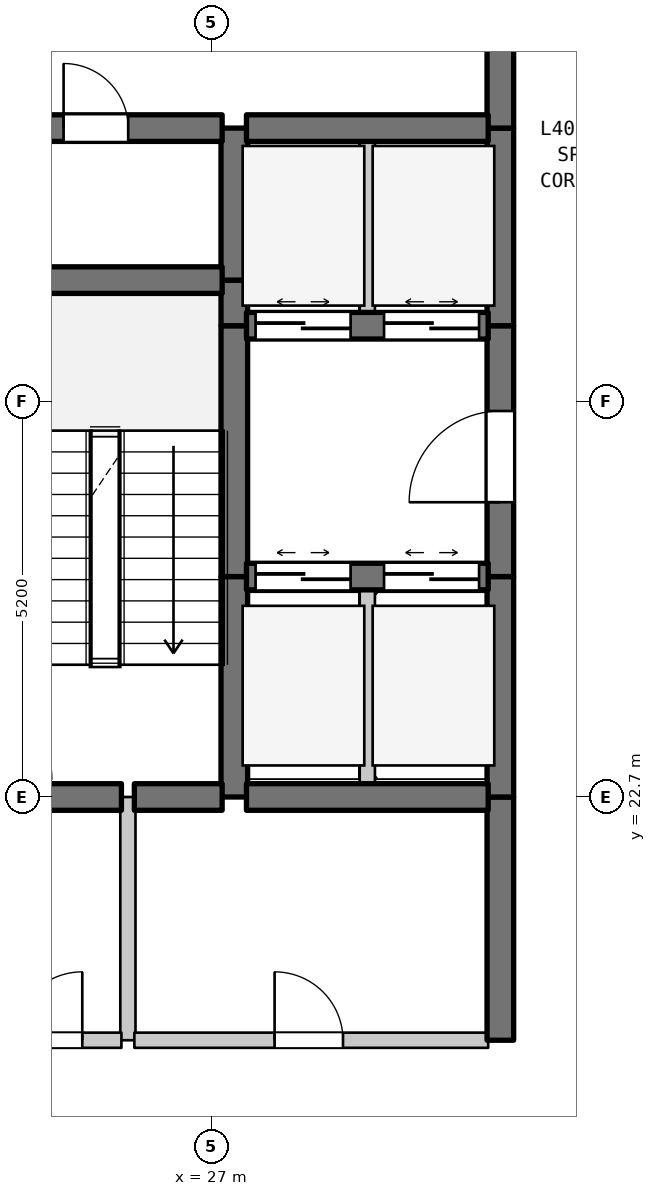
"""IFC4 building model, lengths in metres.
Left out: names, types, materials, properties, quantities, classifications, styles, units other than length and angle.
Written with IfcOpenShell. Run it as: python <this file> out.ifc"""

import sys

from ifc_helpers import new_model, si_unit, direction, frame, frame_2d, origin, place, context, subcontext, project, spatial, rectangle, extrude, element, fill, save


model = new_model("IFC4")
c1 = context("Model", 3, precision=1e-05, world=origin(), true_north=direction((0.0, 1.0)))
c2 = subcontext(c1, "Body", "Model", "MODEL_VIEW")
j1 = project(units=[si_unit("LENGTHUNIT", "METRE"), si_unit("PLANEANGLEUNIT", "RADIAN")], contexts=[c1])
p1 = place(None, origin())
s1 = spatial("IfcSite", under=j1, at=p1, CompositionType="ELEMENT")
p2 = place(p1, origin())
s2 = spatial("IfcBuilding", under=s1, at=p2, CompositionType="ELEMENT")
p3 = place(p2, frame((0.0, 0.0, 164.6)))
s3 = spatial("IfcBuildingStorey", under=s2, at=p3, CompositionType="ELEMENT", Elevation=164.6)
p4 = place(p3, frame((25.9, 19.5, 0.0), z_axis=(0.0, 0.0, 1.0), x_axis=(0.0, 1.0, 0.0)))
e1 = element("IfcWall", 1, at=p4, inside=s3, PredefinedType="STANDARD", context=c2, shape_type="SweptSolid", body=[
    extrude(rectangle(XDim=3.2, YDim=0.2, at=frame_2d((1.6, 0.0))), origin(), (0.0, 0.0, 1.0), 4.19),
])
p5 = place(p3, frame((27.3, 22.7, 0.0), z_axis=(0.0, 0.0, 1.0), x_axis=(0.0, 1.0, 0.0)))
e2 = element("IfcWall", 2, at=p5, inside=s3, PredefinedType="SHEAR", context=c2, shape_type="SweptSolid", body=[
    extrude(rectangle(XDim=2.9, YDim=0.35, at=frame_2d((1.45, 0.0))), origin(), (0.0, 0.0, 1.0), 4.19),
])
p6 = place(p3, frame((27.3, 25.6, 0.0), z_axis=(0.0, 0.0, 1.0), x_axis=(0.0, 1.0, 0.0)))
e3 = element("IfcWall", 3, at=p6, inside=s3, PredefinedType="SHEAR", context=c2, shape_type="SweptSolid", body=[
    extrude(rectangle(XDim=3.3, YDim=0.35, at=frame_2d((1.65, 0.0))), origin(), (0.0, 0.0, 1.0), 4.19),
])
p7 = place(p3, frame((27.3, 28.9, 0.0), z_axis=(0.0, 0.0, 1.0), x_axis=(0.0, 1.0, 0.0)))
e4 = element("IfcWall", 4, at=p7, inside=s3, PredefinedType="SHEAR", context=c2, shape_type="SweptSolid", body=[
    extrude(rectangle(XDim=0.6, YDim=0.35, at=frame_2d((0.3, 0.0))), origin(), (0.0, 0.0, 1.0), 4.19),
])
p8 = place(p3, frame((27.3, 29.5, 0.0), z_axis=(0.0, 0.0, 1.0), x_axis=(0.0, 1.0, 0.0)))
e5 = element("IfcWall", 5, at=p8, inside=s3, PredefinedType="SHEAR", context=c2, shape_type="SweptSolid", body=[
    extrude(rectangle(XDim=2.0, YDim=0.35, at=frame_2d((1.0, 0.0))), origin(), (0.0, 0.0, 1.0), 4.19),
])
p9 = place(p3, frame((29.05, 22.7, 0.0), z_axis=(0.0, 0.0, 1.0), x_axis=(0.0, 1.0, 0.0)))
e6 = element("IfcWall", 6, at=p9, inside=s3, PredefinedType="STANDARD", context=c2, shape_type="SweptSolid", body=[
    extrude(rectangle(XDim=2.9, YDim=0.2, at=frame_2d((1.45, 0.0))), origin(), (0.0, 0.0, 1.0), 4.19),
])
p10 = place(p3, frame((29.05, 28.9, 0.0), z_axis=(0.0, 0.0, 1.0), x_axis=(0.0, 1.0, 0.0)))
e7 = element("IfcWall", 7, at=p10, inside=s3, PredefinedType="STANDARD", context=c2, shape_type="SweptSolid", body=[
    extrude(rectangle(XDim=2.6, YDim=0.2, at=frame_2d((1.3, 0.0))), origin(), (0.0, 0.0, 1.0), 4.19),
])
p11 = place(p3, frame((30.8, 19.5, 0.0), z_axis=(0.0, 0.0, 1.0), x_axis=(0.0, 1.0, 0.0)))
e8 = element("IfcWall", 8, at=p11, inside=s3, PredefinedType="SHEAR", context=c2, shape_type="SweptSolid", body=[
    extrude(rectangle(XDim=3.2, YDim=0.35, at=frame_2d((1.6, 0.0))), origin(), (0.0, 0.0, 1.0), 4.19),
])
p12 = place(p3, frame((30.8, 22.7, 0.0), z_axis=(0.0, 0.0, 1.0), x_axis=(0.0, 1.0, 0.0)))
e9 = element("IfcWall", 9, at=p12, inside=s3, PredefinedType="SHEAR", context=c2, shape_type="SweptSolid", body=[
    extrude(rectangle(XDim=2.9, YDim=0.35, at=frame_2d((1.45, 0.0))), origin(), (0.0, 0.0, 1.0), 4.19),
])
p13 = place(p3, frame((30.8, 25.6, 0.0), z_axis=(0.0, 0.0, 1.0), x_axis=(0.0, 1.0, 0.0)))
e10 = element("IfcWall", 10, at=p13, inside=s3, PredefinedType="SHEAR", context=c2, shape_type="SweptSolid", body=[
    extrude(rectangle(XDim=3.3, YDim=0.35, at=frame_2d((1.65, 0.0))), origin(), (0.0, 0.0, 1.0), 4.19),
])
p14 = place(p13, frame((0.978, 0.0, 0.0)))
e11 = element("IfcOpeningElement", 11, at=p14, cuts=e10, PredefinedType="OPENING", context=c2, shape_type="SweptSolid", body=[
    extrude(rectangle(XDim=1.2, YDim=2.2, at=frame_2d((0.6, 1.1))), frame((0.0, 0.185, 0.0), z_axis=(0.0, -1.0, 0.0), x_axis=(1.0, 0.0, 0.0)), (0.0, 0.0, 1.0), 0.37),
])
p15 = place(p3, frame((30.8, 28.9, 0.0), z_axis=(0.0, 0.0, 1.0), x_axis=(0.0, 1.0, 0.0)))
e12 = element("IfcWall", 12, at=p15, inside=s3, PredefinedType="SHEAR", context=c2, shape_type="SweptSolid", body=[
    extrude(rectangle(XDim=2.6, YDim=0.35, at=frame_2d((1.3, 0.0))), origin(), (0.0, 0.0, 1.0), 4.19),
])
p16 = place(p3, frame((30.8, 31.5, 0.0), z_axis=(0.0, 0.0, 1.0), x_axis=(0.0, 1.0, 0.0)))
e13 = element("IfcWall", 13, at=p16, inside=s3, PredefinedType="SHEAR", context=c2, shape_type="SweptSolid", body=[
    extrude(rectangle(XDim=3.5, YDim=0.35, at=frame_2d((1.75, 0.0))), origin(), (0.0, 0.0, 1.0), 4.19),
])
p17 = place(p16, frame((1.15, 0.0, 0.0)))
e14 = element("IfcOpeningElement", 14, at=p17, cuts=e13, PredefinedType="OPENING", context=c2, shape_type="SweptSolid", body=[
    extrude(rectangle(XDim=1.2, YDim=2.2, at=frame_2d((0.6, 1.1))), frame((0.0, 0.185, 0.0), z_axis=(0.0, -1.0, 0.0), x_axis=(1.0, 0.0, 0.0)), (0.0, 0.0, 1.0), 0.37),
])
p18 = place(p3, frame((23.96, 19.5, 0.0), z_axis=(0.0, 0.0, 1.0), x_axis=(1.0, 0.0, 0.0)))
e15 = element("IfcWall", 15, at=p18, inside=s3, PredefinedType="STANDARD", context=c2, shape_type="SweptSolid", body=[
    extrude(rectangle(XDim=1.855, YDim=0.2, at=frame_2d((0.927, 0.0))), origin(), (0.0, 0.0, 1.0), 4.19),
])
p19 = place(p18, frame((0.44, 0.0, 0.0)))
e16 = element("IfcOpeningElement", 16, at=p19, cuts=e15, PredefinedType="OPENING", context=c2, shape_type="SweptSolid", body=[
    extrude(rectangle(XDim=0.9, YDim=2.15, at=frame_2d((0.45, 1.075))), frame((0.0, 0.11, 0.0), z_axis=(0.0, -1.0, 0.0), x_axis=(1.0, 0.0, 0.0)), (0.0, 0.0, 1.0), 0.22),
])
p20 = place(p3, frame((25.985, 19.5, 0.0), z_axis=(0.0, 0.0, 1.0), x_axis=(1.0, 0.0, 0.0)))
e17 = element("IfcWall", 17, at=p20, inside=s3, PredefinedType="STANDARD", context=c2, shape_type="SweptSolid", body=[
    extrude(rectangle(XDim=4.655, YDim=0.2, at=frame_2d((2.327, 0.0))), origin(), (0.0, 0.0, 1.0), 4.19),
])
p21 = place(p20, frame((1.845, 0.0, 0.0)))
e18 = element("IfcOpeningElement", 18, at=p21, cuts=e17, PredefinedType="OPENING", context=c2, shape_type="SweptSolid", body=[
    extrude(rectangle(XDim=0.9, YDim=2.15, at=frame_2d((0.45, 1.075))), frame((0.0, 0.11, 0.0), z_axis=(0.0, -1.0, 0.0), x_axis=(1.0, 0.0, 0.0)), (0.0, 0.0, 1.0), 0.22),
])
p22 = place(p3, frame((23.96, 22.7, 0.0), z_axis=(0.0, 0.0, 1.0), x_axis=(1.0, 0.0, 0.0)))
e19 = element("IfcWall", 19, at=p22, inside=s3, PredefinedType="SHEAR", context=c2, shape_type="SweptSolid", body=[
    extrude(rectangle(XDim=1.855, YDim=0.35, at=frame_2d((0.927, 0.0))), origin(), (0.0, 0.0, 1.0), 4.19),
])
p23 = place(p3, frame((25.985, 22.7, 0.0), z_axis=(0.0, 0.0, 1.0), x_axis=(1.0, 0.0, 0.0)))
e20 = element("IfcWall", 20, at=p23, inside=s3, PredefinedType="SHEAR", context=c2, shape_type="SweptSolid", body=[
    extrude(rectangle(XDim=1.155, YDim=0.35, at=frame_2d((0.577, 0.0))), origin(), (0.0, 0.0, 1.0), 4.19),
])
p24 = place(p3, frame((27.46, 22.7, 0.0), z_axis=(0.0, 0.0, 1.0), x_axis=(1.0, 0.0, 0.0)))
e21 = element("IfcWall", 21, at=p24, inside=s3, PredefinedType="SHEAR", context=c2, shape_type="SweptSolid", body=[
    extrude(rectangle(XDim=3.18, YDim=0.35, at=frame_2d((1.59, 0.0))), origin(), (0.0, 0.0, 1.0), 4.19),
])
p25 = place(p3, frame((27.46, 25.6, 0.0), z_axis=(0.0, 0.0, 1.0), x_axis=(1.0, 0.0, 0.0)))
e22 = element("IfcWall", 22, at=p25, inside=s3, PredefinedType="SHEAR", context=c2, shape_type="SweptSolid", body=[
    extrude(rectangle(XDim=3.18, YDim=0.35, at=frame_2d((1.59, 0.0))), origin(), (0.0, 0.0, 1.0), 4.19),
])
p26 = place(p25, frame((0.12, 0.0, 0.0)))
e23 = element("IfcOpeningElement", 23, at=p26, cuts=e22, PredefinedType="OPENING", context=c2, shape_type="SweptSolid", body=[
    extrude(rectangle(XDim=1.25, YDim=2.2, at=frame_2d((0.625, 1.1))), frame((0.0, 0.185, 0.0), z_axis=(0.0, -1.0, 0.0), x_axis=(1.0, 0.0, 0.0)), (0.0, 0.0, 1.0), 0.37),
])
p27 = place(p25, frame((1.81, 0.0, 0.0)))
e24 = element("IfcOpeningElement", 24, at=p27, cuts=e22, PredefinedType="OPENING", context=c2, shape_type="SweptSolid", body=[
    extrude(rectangle(XDim=1.25, YDim=2.2, at=frame_2d((0.625, 1.1))), frame((0.0, 0.185, 0.0), z_axis=(0.0, -1.0, 0.0), x_axis=(1.0, 0.0, 0.0)), (0.0, 0.0, 1.0), 0.37),
])
p28 = place(p3, frame((27.46, 28.9, 0.0), z_axis=(0.0, 0.0, 1.0), x_axis=(1.0, 0.0, 0.0)))
e25 = element("IfcWall", 25, at=p28, inside=s3, PredefinedType="SHEAR", context=c2, shape_type="SweptSolid", body=[
    extrude(rectangle(XDim=3.18, YDim=0.35, at=frame_2d((1.59, 0.0))), origin(), (0.0, 0.0, 1.0), 4.19),
])
p29 = place(p28, frame((0.12, 0.0, 0.0)))
e26 = element("IfcOpeningElement", 26, at=p29, cuts=e25, PredefinedType="OPENING", context=c2, shape_type="SweptSolid", body=[
    extrude(rectangle(XDim=1.25, YDim=2.2, at=frame_2d((0.625, 1.1))), frame((0.0, 0.185, 0.0), z_axis=(0.0, -1.0, 0.0), x_axis=(1.0, 0.0, 0.0)), (0.0, 0.0, 1.0), 0.37),
])
p30 = place(p28, frame((1.81, 0.0, 0.0)))
e27 = element("IfcOpeningElement", 27, at=p30, cuts=e25, PredefinedType="OPENING", context=c2, shape_type="SweptSolid", body=[
    extrude(rectangle(XDim=1.25, YDim=2.2, at=frame_2d((0.625, 1.1))), frame((0.0, 0.185, 0.0), z_axis=(0.0, -1.0, 0.0), x_axis=(1.0, 0.0, 0.0)), (0.0, 0.0, 1.0), 0.37),
])
p31 = place(p3, frame((23.96, 29.5, 0.0), z_axis=(0.0, 0.0, 1.0), x_axis=(1.0, 0.0, 0.0)))
e28 = element("IfcWall", 28, at=p31, inside=s3, PredefinedType="SHEAR", context=c2, shape_type="SweptSolid", body=[
    extrude(rectangle(XDim=3.18, YDim=0.35, at=frame_2d((1.59, 0.0))), origin(), (0.0, 0.0, 1.0), 4.19),
])
p32 = place(p3, frame((23.96, 31.5, 0.0), z_axis=(0.0, 0.0, 1.0), x_axis=(1.0, 0.0, 0.0)))
e29 = element("IfcWall", 29, at=p32, inside=s3, PredefinedType="SHEAR", context=c2, shape_type="SweptSolid", body=[
    extrude(rectangle(XDim=3.18, YDim=0.35, at=frame_2d((1.59, 0.0))), origin(), (0.0, 0.0, 1.0), 4.19),
])
p33 = place(p32, frame((1.094, 0.0, 0.0)))
e30 = element("IfcOpeningElement", 30, at=p33, cuts=e29, PredefinedType="OPENING", context=c2, shape_type="SweptSolid", body=[
    extrude(rectangle(XDim=0.85, YDim=2.1, at=frame_2d((0.425, 1.05))), frame((0.0, 0.185, 0.0), z_axis=(0.0, -1.0, 0.0), x_axis=(1.0, 0.0, 0.0)), (0.0, 0.0, 1.0), 0.37),
])
p34 = place(p3, frame((27.46, 31.5, 0.0), z_axis=(0.0, 0.0, 1.0), x_axis=(1.0, 0.0, 0.0)))
e31 = element("IfcWall", 31, at=p34, inside=s3, PredefinedType="SHEAR", context=c2, shape_type="SweptSolid", body=[
    extrude(rectangle(XDim=3.18, YDim=0.35, at=frame_2d((1.59, 0.0))), origin(), (0.0, 0.0, 1.0), 4.19),
])
p35 = place(p14, origin())
e32 = element("IfcDoor", 32, at=p35, inside=s3, OperationType="SINGLE_SWING_LEFT", PredefinedType="DOOR", context=c2, shape_type="SweptSolid", body=[
    extrude(rectangle(XDim=1.2, YDim=2.2, at=frame_2d((0.6, 1.1))), frame((0.0, 0.025, 0.0), z_axis=(0.0, -1.0, 0.0), x_axis=(1.0, 0.0, 0.0)), (0.0, 0.0, 1.0), 0.05),
])
fill(e11, e32)
p36 = place(p19, origin())
e33 = element("IfcDoor", 33, at=p36, inside=s3, OperationType="SINGLE_SWING_RIGHT", PredefinedType="DOOR", context=c2, shape_type="SweptSolid", body=[
    extrude(rectangle(XDim=0.9, YDim=2.15, at=frame_2d((0.45, 1.075))), frame((0.0, 0.025, 0.0), z_axis=(0.0, -1.0, 0.0), x_axis=(1.0, 0.0, 0.0)), (0.0, 0.0, 1.0), 0.05),
])
fill(e16, e33)
p37 = place(p21, origin())
e34 = element("IfcDoor", 34, at=p37, inside=s3, OperationType="SINGLE_SWING_LEFT", PredefinedType="DOOR", context=c2, shape_type="SweptSolid", body=[
    extrude(rectangle(XDim=0.9, YDim=2.15, at=frame_2d((0.45, 1.075))), frame((0.0, 0.025, 0.0), z_axis=(0.0, -1.0, 0.0), x_axis=(1.0, 0.0, 0.0)), (0.0, 0.0, 1.0), 0.05),
])
fill(e18, e34)
p38 = place(p26, origin())
e35 = element("IfcDoor", 35, at=p38, inside=s3, OperationType="DOUBLE_DOOR_SLIDING", PredefinedType="DOOR", context=c2, shape_type="SweptSolid", body=[
    extrude(rectangle(XDim=1.25, YDim=2.2, at=frame_2d((0.625, 1.1))), frame((0.0, 0.025, 0.0), z_axis=(0.0, -1.0, 0.0), x_axis=(1.0, 0.0, 0.0)), (0.0, 0.0, 1.0), 0.05),
])
fill(e23, e35)
p39 = place(p27, origin())
e36 = element("IfcDoor", 36, at=p39, inside=s3, OperationType="DOUBLE_DOOR_SLIDING", PredefinedType="DOOR", context=c2, shape_type="SweptSolid", body=[
    extrude(rectangle(XDim=1.25, YDim=2.2, at=frame_2d((0.625, 1.1))), frame((0.0, 0.025, 0.0), z_axis=(0.0, -1.0, 0.0), x_axis=(1.0, 0.0, 0.0)), (0.0, 0.0, 1.0), 0.05),
])
fill(e24, e36)
p40 = place(p29, origin())
e37 = element("IfcDoor", 37, at=p40, inside=s3, OperationType="DOUBLE_DOOR_SLIDING", PredefinedType="DOOR", context=c2, shape_type="SweptSolid", body=[
    extrude(rectangle(XDim=1.25, YDim=2.2, at=frame_2d((0.625, 1.1))), frame((0.0, 0.025, 0.0), z_axis=(0.0, -1.0, 0.0), x_axis=(1.0, 0.0, 0.0)), (0.0, 0.0, 1.0), 0.05),
])
fill(e26, e37)
p41 = place(p30, origin())
e38 = element("IfcDoor", 38, at=p41, inside=s3, OperationType="DOUBLE_DOOR_SLIDING", PredefinedType="DOOR", context=c2, shape_type="SweptSolid", body=[
    extrude(rectangle(XDim=1.25, YDim=2.2, at=frame_2d((0.625, 1.1))), frame((0.0, 0.025, 0.0), z_axis=(0.0, -1.0, 0.0), x_axis=(1.0, 0.0, 0.0)), (0.0, 0.0, 1.0), 0.05),
])
fill(e27, e38)
p42 = place(p33, origin())
e39 = element("IfcDoor", 39, at=p42, inside=s3, OperationType="SINGLE_SWING_LEFT", PredefinedType="DOOR", context=c2, shape_type="SweptSolid", body=[
    extrude(rectangle(XDim=0.85, YDim=2.1, at=frame_2d((0.425, 1.05))), frame((0.0, 0.025, 0.0), z_axis=(0.0, -1.0, 0.0), x_axis=(1.0, 0.0, 0.0)), (0.0, 0.0, 1.0), 0.05),
])
fill(e30, e39)
save(model, sys.argv[1])
